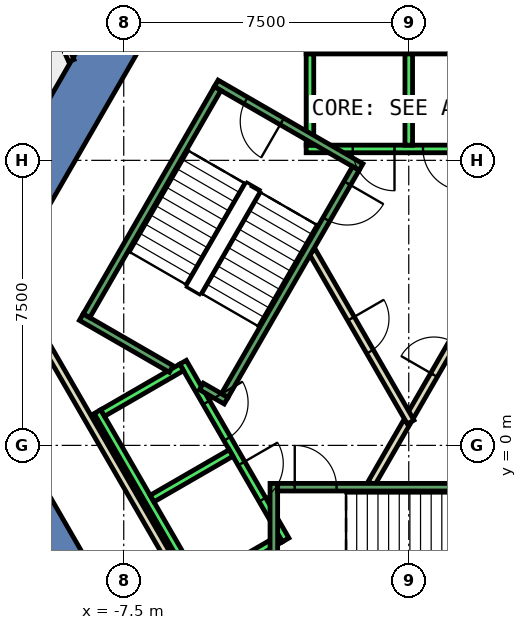
"""IFC4 building model, lengths in metres.
Left out: names, types, materials, properties, quantities, classifications, styles, units other than length and angle.
Written with IfcOpenShell. Run it as: python <this file> out.ifc"""

import sys

from ifc_helpers import new_model, si_unit, direction, frame, frame_2d, origin, place, context, subcontext, project, spatial, polyline, rectangle, outline, extrude, element, fill, save


model = new_model("IFC4")
c1 = context("Model", 3, precision=1e-05, world=origin(), true_north=direction((0.0, 1.0)))
c2 = subcontext(c1, "Body", "Model", "MODEL_VIEW")
j1 = project(units=[si_unit("LENGTHUNIT", "METRE"), si_unit("PLANEANGLEUNIT", "RADIAN")], contexts=[c1])
p1 = place(None, origin())
s1 = spatial("IfcSite", under=j1, at=p1, CompositionType="ELEMENT")
p2 = place(p1, origin())
s2 = spatial("IfcBuilding", under=s1, at=p2, CompositionType="ELEMENT")
p3 = place(p2, frame((0.0, 0.0, 231.8)))
s3 = spatial("IfcBuildingStorey", under=s2, at=p3, CompositionType="ELEMENT", Elevation=231.8)
p4 = place(p3, frame((0.0, 0.0, -0.4)))
e1 = element("IfcWall", 1, at=p4, inside=s3, PredefinedType="SHEAR", context=c2, shape_type="SweptSolid", body=[
    extrude(outline(polyline([(-11.834, 5.002), (-10.622, 4.302), (-5.831, 12.6), (-6.64, 14.0), (-11.834, 5.002)])), origin(), (0.0, 0.0, 1.0), 4.0),
])
p5 = place(p3, frame((0.0, 0.0, -0.4)))
e2 = element("IfcWall", 2, at=p5, inside=s3, PredefinedType="SHEAR", context=c2, shape_type="SweptSolid", body=[
    extrude(outline(polyline([(-13.279, 2.5), (-6.64, -9.0), (-5.831, -7.6), (-11.662, 2.5), (-13.279, 2.5)])), origin(), (0.0, 0.0, 1.0), 4.0),
])
p6 = place(p3, frame((-9.751, 2.99, 0.0), z_axis=(0.0, 0.0, 1.0), x_axis=(0.500012163284, -0.866018381195, 0.0)))
e3 = element("IfcWall", 3, at=p6, inside=s3, PredefinedType="PARTITIONING", context=c2, shape_type="SweptSolid", body=[
    extrude(rectangle(XDim=8.0, YDim=0.2, at=frame_2d((4.0, 0.0))), origin(), (0.0, 0.0, 1.0), 3.6),
])
p7 = place(p3, frame((-8.879, 10.123, 0.0), z_axis=(0.0, 0.0, 1.0), x_axis=(-0.404271206787, 0.914639159102, 0.0)))
e4 = element("IfcWall", 4, at=p7, inside=s3, PredefinedType="PARTITIONING", context=c2, shape_type="SweptSolid", body=[
    extrude(rectangle(XDim=3.495, YDim=0.15, at=frame_2d((1.748, 0.0))), origin(), (0.0, 0.0, 1.0), 3.6),
])
p8 = place(p3, frame((-0.982, -1.0, 0.0), z_axis=(0.0, 0.0, 1.0), x_axis=(0.50024047865, 0.865886518847, 0.0)))
e5 = element("IfcWall", 5, at=p8, inside=s3, PredefinedType="PARTITIONING", context=c2, shape_type="SweptSolid", body=[
    extrude(rectangle(XDim=1.863, YDim=0.2, at=frame_2d((0.931, 0.0))), origin(), (0.0, 0.0, 1.0), 3.6),
])
p9 = place(p3, frame((0.05, 0.787, 0.0), z_axis=(0.0, 0.0, 1.0), x_axis=(0.499954076797, 0.866051915934, 0.0)))
e6 = element("IfcWall", 6, at=p9, inside=s3, PredefinedType="PARTITIONING", context=c2, shape_type="SweptSolid", body=[
    extrude(rectangle(XDim=3.558, YDim=0.2, at=frame_2d((1.779, 0.0))), origin(), (0.0, 0.0, 1.0), 3.6),
])
p10 = place(p9, frame((1.229, 0.0, 0.0)))
e7 = element("IfcOpeningElement", 7, at=p10, cuts=e6, PredefinedType="OPENING", context=c2, shape_type="SweptSolid", body=[
    extrude(rectangle(XDim=1.0, YDim=2.1, at=frame_2d((0.5, 1.05))), frame((0.0, 0.11, 0.0), z_axis=(0.0, -1.0, 0.0), x_axis=(1.0, 0.0, 0.0)), (0.0, 0.0, 1.0), 0.22),
])
p11 = place(p3, frame((-2.54, 5.1, 0.0), z_axis=(0.0, 0.0, 1.0), x_axis=(0.499925051871, -0.866068670783, 0.0)))
e8 = element("IfcWall", 8, at=p11, inside=s3, PredefinedType="PARTITIONING", context=c2, shape_type="SweptSolid", body=[
    extrude(rectangle(XDim=5.181, YDim=0.2, at=frame_2d((2.59, 0.0))), origin(), (0.0, 0.0, 1.0), 3.6),
])
p12 = place(p11, frame((2.04, 0.0, 0.0)))
e9 = element("IfcOpeningElement", 9, at=p12, cuts=e8, PredefinedType="OPENING", context=c2, shape_type="SweptSolid", body=[
    extrude(rectangle(XDim=1.0, YDim=2.1, at=frame_2d((0.5, 1.05))), frame((0.0, 0.11, 0.0), z_axis=(0.0, -1.0, 0.0), x_axis=(1.0, 0.0, 0.0)), (0.0, 0.0, 1.0), 0.22),
])
p13 = place(p3, frame((2.7, 7.8, 0.0), z_axis=(0.0, 0.0, 1.0), x_axis=(-1.0, 0.0, 0.0)))
e10 = element("IfcWall", 10, at=p13, inside=s3, PredefinedType="STANDARD", context=c2, shape_type="SweptSolid", body=[
    extrude(rectangle(XDim=5.4, YDim=0.2, at=frame_2d((2.7, 0.0))), origin(), (0.0, 0.0, 1.0), 3.6),
])
p14 = place(p13, frame((1.225, 0.0, 0.0)))
e11 = element("IfcOpeningElement", 11, at=p14, cuts=e10, PredefinedType="OPENING", context=c2, shape_type="SweptSolid", body=[
    extrude(rectangle(XDim=1.1, YDim=2.1, at=frame_2d((0.55, 1.05))), frame((0.0, 0.11, 0.0), z_axis=(0.0, -1.0, 0.0), x_axis=(1.0, 0.0, 0.0)), (0.0, 0.0, 1.0), 0.22),
])
p15 = place(p13, frame((3.075, 0.0, 0.0)))
e12 = element("IfcOpeningElement", 12, at=p15, cuts=e10, PredefinedType="OPENING", context=c2, shape_type="SweptSolid", body=[
    extrude(rectangle(XDim=1.1, YDim=2.1, at=frame_2d((0.55, 1.05))), frame((0.0, 0.11, 0.0), z_axis=(0.0, -1.0, 0.0), x_axis=(1.0, 0.0, 0.0)), (0.0, 0.0, 1.0), 0.22),
])
p16 = place(p3, frame((2.7, 10.4, 0.0), z_axis=(0.0, 0.0, 1.0), x_axis=(-1.0, 0.0, 0.0)))
e13 = element("IfcWall", 13, at=p16, inside=s3, PredefinedType="STANDARD", context=c2, shape_type="SweptSolid", body=[
    extrude(rectangle(XDim=5.4, YDim=0.2, at=frame_2d((2.7, 0.0))), origin(), (0.0, 0.0, 1.0), 3.6),
])
for number, where, z_axis, x_axis in (
    (14, (0.0, 7.9, 0.0), (0.0, 0.0, 1.0), (0.0, 1.0, 0.0)),
    (15, (-2.6, 7.9, 0.0), (0.0, 0.0, 1.0), (0.0, 1.0, 0.0)),
):
    element("IfcWall", number, at=place(p3, frame(where, z_axis=z_axis, x_axis=x_axis)), inside=s3, PredefinedType="STANDARD", context=c2, shape_type="SweptSolid", body=[
        extrude(rectangle(XDim=2.4, YDim=0.2, at=frame_2d((1.2, 0.0))), origin(), (0.0, 0.0, 1.0), 3.6),
    ])
p17 = place(p3, frame((-5.94, 2.188, 0.0), z_axis=(0.0, 0.0, 1.0), x_axis=(0.500034260056, -0.866005622828, 0.0)))
e16 = element("IfcWall", 16, at=p17, inside=s3, PredefinedType="STANDARD", context=c2, shape_type="SweptSolid", body=[
    extrude(rectangle(XDim=5.399, YDim=0.2, at=frame_2d((2.7, 0.0))), origin(), (0.0, 0.0, 1.0), 3.6),
])
p18 = place(p17, frame((3.075, 0.0, 0.0)))
e17 = element("IfcOpeningElement", 17, at=p18, cuts=e16, PredefinedType="OPENING", context=c2, shape_type="SweptSolid", body=[
    extrude(rectangle(XDim=1.1, YDim=2.1, at=frame_2d((0.55, 1.05))), frame((0.0, 0.11, 0.0), z_axis=(0.0, -1.0, 0.0), x_axis=(1.0, 0.0, 0.0)), (0.0, 0.0, 1.0), 0.22),
])
p19 = place(p17, frame((1.225, 0.0, 0.0)))
e18 = element("IfcOpeningElement", 18, at=p19, cuts=e16, PredefinedType="OPENING", context=c2, shape_type="SweptSolid", body=[
    extrude(rectangle(XDim=1.1, YDim=2.1, at=frame_2d((0.55, 1.05))), frame((0.0, 0.11, 0.0), z_axis=(0.0, -1.0, 0.0), x_axis=(1.0, 0.0, 0.0)), (0.0, 0.0, 1.0), 0.22),
])
p20 = place(p3, frame((-8.192, 0.888, 0.0), z_axis=(0.0, 0.0, 1.0), x_axis=(0.500034260056, -0.866005622828, 0.0)))
e19 = element("IfcWall", 19, at=p20, inside=s3, PredefinedType="STANDARD", context=c2, shape_type="SweptSolid", body=[
    extrude(rectangle(XDim=5.399, YDim=0.2, at=frame_2d((2.7, 0.0))), origin(), (0.0, 0.0, 1.0), 3.6),
])
for number, where, z_axis, x_axis in (
    (20, (-5.977, 2.052, 0.0), (0.0, 0.0, 1.0), (-0.866, -0.5, 0.0)),
    (21, (-4.677, -0.2, 0.0), (0.0, 0.0, 1.0), (-0.866, -0.5, 0.0)),
):
    element("IfcWall", number, at=place(p3, frame(where, z_axis=z_axis, x_axis=x_axis)), inside=s3, PredefinedType="STANDARD", context=c2, shape_type="SweptSolid", body=[
        extrude(rectangle(XDim=2.399, YDim=0.2, at=frame_2d((1.2, 0.0))), origin(), (0.0, 0.0, 1.0), 3.6),
    ])
p21 = place(p3, frame((-3.377, -2.452, 0.0), z_axis=(0.0, 0.0, 1.0), x_axis=(-0.865955154139, -0.50012165622, 0.0)))
e22 = element("IfcWall", 22, at=p21, inside=s3, PredefinedType="STANDARD", context=c2, shape_type="SweptSolid", body=[
    extrude(rectangle(XDim=2.4, YDim=0.2, at=frame_2d((1.2, 0.0))), origin(), (0.0, 0.0, 1.0), 3.6),
])
p22 = place(p3, frame((-3.55, -1.0, 0.0), z_axis=(0.0, 0.0, 1.0), x_axis=(0.0, -1.0, 0.0)))
e23 = element("IfcWall", 23, at=p22, inside=s3, PredefinedType="STANDARD", context=c2, shape_type="SweptSolid", body=[
    extrude(rectangle(XDim=4.4, YDim=0.2, at=frame_2d((2.2, 0.0))), origin(), (0.0, 0.0, 1.0), 3.6),
])
p23 = place(p22, frame((2.4, 0.0, 0.0)))
e24 = element("IfcOpeningElement", 24, at=p23, cuts=e23, PredefinedType="OPENING", context=c2, shape_type="SweptSolid", body=[
    extrude(rectangle(XDim=1.1, YDim=2.2, at=frame_2d((0.55, 1.1))), frame((0.0, 0.11, 0.0), z_axis=(0.0, -1.0, 0.0), x_axis=(1.0, 0.0, 0.0)), (0.0, 0.0, 1.0), 0.22),
])
p24 = place(p3, frame((-3.45, -1.1, 0.0), z_axis=(0.0, 0.0, 1.0), x_axis=(1.0, 0.0, 0.0)))
e25 = element("IfcWall", 25, at=p24, inside=s3, PredefinedType="STANDARD", context=c2, shape_type="SweptSolid", body=[
    extrude(rectangle(XDim=6.9, YDim=0.2, at=frame_2d((3.45, 0.0))), origin(), (0.0, 0.0, 1.0), 3.6),
])
p25 = place(p24, frame((0.45, 0.0, 0.0)))
e26 = element("IfcOpeningElement", 26, at=p25, cuts=e25, PredefinedType="OPENING", context=c2, shape_type="SweptSolid", body=[
    extrude(rectangle(XDim=1.1, YDim=2.2, at=frame_2d((0.55, 1.1))), frame((0.0, 0.11, 0.0), z_axis=(0.0, -1.0, 0.0), x_axis=(1.0, 0.0, 0.0)), (0.0, 0.0, 1.0), 0.22),
])
p26 = place(p3, frame((-1.256, 7.324, 0.0), z_axis=(0.0, 0.0, 1.0), x_axis=(-0.866046073146, 0.499964197906, 0.0)))
e27 = element("IfcWall", 27, at=p26, inside=s3, PredefinedType="STANDARD", context=c2, shape_type="SweptSolid", body=[
    extrude(rectangle(XDim=4.4, YDim=0.2, at=frame_2d((2.2, 0.0))), origin(), (0.0, 0.0, 1.0), 3.6),
])
p27 = place(p26, frame((2.4, 0.0, 0.0)))
e28 = element("IfcOpeningElement", 28, at=p27, cuts=e27, PredefinedType="OPENING", context=c2, shape_type="SweptSolid", body=[
    extrude(rectangle(XDim=1.1, YDim=2.2, at=frame_2d((0.55, 1.1))), frame((0.0, 0.11, 0.0), z_axis=(0.0, -1.0, 0.0), x_axis=(1.0, 0.0, 0.0)), (0.0, 0.0, 1.0), 0.22),
])
p28 = place(p3, frame((-6.25, 2.01, 0.0), z_axis=(0.0, 0.0, 1.0), x_axis=(-0.86611865017, 0.499838457731, 0.0)))
e29 = element("IfcWall", 29, at=p28, inside=s3, PredefinedType="STANDARD", context=c2, shape_type="SweptSolid", body=[
    extrude(rectangle(XDim=2.733, YDim=0.2, at=frame_2d((1.366, 0.0))), origin(), (0.0, 0.0, 1.0), 3.6),
])
p29 = place(p3, frame((-4.806, 1.176, 0.0), z_axis=(0.0, 0.0, 1.0), x_axis=(-0.866558586415, 0.499075361355, 0.0)))
e30 = element("IfcWall", 30, at=p29, inside=s3, PredefinedType="STANDARD", context=c2, shape_type="SweptSolid", body=[
    extrude(rectangle(XDim=0.751, YDim=0.2, at=frame_2d((0.376, 0.0))), origin(), (0.0, 0.0, 1.0), 3.6),
])
p30 = place(p3, frame((-1.393, 7.288, 0.0), z_axis=(0.0, 0.0, 1.0), x_axis=(-0.499963383562, -0.866046543262, 0.0)))
e31 = element("IfcWall", 31, at=p30, inside=s3, PredefinedType="STANDARD", context=c2, shape_type="SweptSolid", body=[
    extrude(rectangle(XDim=6.9, YDim=0.2, at=frame_2d((3.45, 0.0))), origin(), (0.0, 0.0, 1.0), 3.6),
])
p31 = place(p30, frame((0.45, 0.0, 0.0)))
e32 = element("IfcOpeningElement", 32, at=p31, cuts=e31, PredefinedType="OPENING", context=c2, shape_type="SweptSolid", body=[
    extrude(rectangle(XDim=1.1, YDim=2.2, at=frame_2d((0.55, 1.1))), frame((0.0, 0.11, 0.0), z_axis=(0.0, -1.0, 0.0), x_axis=(1.0, 0.0, 0.0)), (0.0, 0.0, 1.0), 0.22),
])
p32 = place(p3, frame((-5.03, 9.388, 0.0), z_axis=(0.0, 0.0, 1.0), x_axis=(-0.499978703459, -0.866037698999, 0.0)))
e33 = element("IfcWall", 33, at=p32, inside=s3, PredefinedType="STANDARD", context=c2, shape_type="SweptSolid", body=[
    extrude(rectangle(XDim=6.9, YDim=0.2, at=frame_2d((3.45, 0.0))), origin(), (0.0, 0.0, 1.0), 3.6),
])
p33 = place(p10, origin())
e34 = element("IfcDoor", 34, at=p33, inside=s3, OperationType="SINGLE_SWING_RIGHT", PredefinedType="DOOR", context=c2, shape_type="SweptSolid", body=[
    extrude(rectangle(XDim=1.0, YDim=2.1, at=frame_2d((0.5, 1.05))), frame((0.0, 0.025, 0.0), z_axis=(0.0, -1.0, 0.0), x_axis=(1.0, 0.0, 0.0)), (0.0, 0.0, 1.0), 0.05),
])
fill(e7, e34)
p34 = place(p12, origin())
e35 = element("IfcDoor", 35, at=p34, inside=s3, OperationType="SINGLE_SWING_RIGHT", PredefinedType="DOOR", context=c2, shape_type="SweptSolid", body=[
    extrude(rectangle(XDim=1.0, YDim=2.1, at=frame_2d((0.5, 1.05))), frame((0.0, 0.025, 0.0), z_axis=(0.0, -1.0, 0.0), x_axis=(1.0, 0.0, 0.0)), (0.0, 0.0, 1.0), 0.05),
])
fill(e9, e35)
p35 = place(p14, origin())
e36 = element("IfcDoor", 36, at=p35, inside=s3, OperationType="SLIDING_TO_LEFT", PredefinedType="DOOR", context=c2, shape_type="SweptSolid", body=[
    extrude(rectangle(XDim=1.1, YDim=2.1, at=frame_2d((0.55, 1.05))), frame((0.0, 0.025, 0.0), z_axis=(0.0, -1.0, 0.0), x_axis=(1.0, 0.0, 0.0)), (0.0, 0.0, 1.0), 0.05),
])
fill(e11, e36)
p36 = place(p15, origin())
e37 = element("IfcDoor", 37, at=p36, inside=s3, OperationType="SLIDING_TO_LEFT", PredefinedType="DOOR", context=c2, shape_type="SweptSolid", body=[
    extrude(rectangle(XDim=1.1, YDim=2.1, at=frame_2d((0.55, 1.05))), frame((0.0, 0.025, 0.0), z_axis=(0.0, -1.0, 0.0), x_axis=(1.0, 0.0, 0.0)), (0.0, 0.0, 1.0), 0.05),
])
fill(e12, e37)
p37 = place(p18, origin())
e38 = element("IfcDoor", 38, at=p37, inside=s3, OperationType="SLIDING_TO_LEFT", PredefinedType="DOOR", context=c2, shape_type="SweptSolid", body=[
    extrude(rectangle(XDim=1.1, YDim=2.1, at=frame_2d((0.55, 1.05))), frame((0.0, 0.025, 0.0), z_axis=(0.0, -1.0, 0.0), x_axis=(1.0, 0.0, 0.0)), (0.0, 0.0, 1.0), 0.05),
])
fill(e17, e38)
p38 = place(p19, origin())
e39 = element("IfcDoor", 39, at=p38, inside=s3, OperationType="SLIDING_TO_LEFT", PredefinedType="DOOR", context=c2, shape_type="SweptSolid", body=[
    extrude(rectangle(XDim=1.1, YDim=2.1, at=frame_2d((0.55, 1.05))), frame((0.0, 0.025, 0.0), z_axis=(0.0, -1.0, 0.0), x_axis=(1.0, 0.0, 0.0)), (0.0, 0.0, 1.0), 0.05),
])
fill(e18, e39)
p39 = place(p25, origin())
e40 = element("IfcDoor", 40, at=p39, inside=s3, OperationType="SINGLE_SWING_LEFT", PredefinedType="DOOR", context=c2, shape_type="SweptSolid", body=[
    extrude(rectangle(XDim=1.1, YDim=2.2, at=frame_2d((0.55, 1.1))), frame((0.0, 0.025, 0.0), z_axis=(0.0, -1.0, 0.0), x_axis=(1.0, 0.0, 0.0)), (0.0, 0.0, 1.0), 0.05),
])
fill(e26, e40)
p40 = place(p31, origin())
e41 = element("IfcDoor", 41, at=p40, inside=s3, OperationType="SINGLE_SWING_LEFT", PredefinedType="DOOR", context=c2, shape_type="SweptSolid", body=[
    extrude(rectangle(XDim=1.1, YDim=2.2, at=frame_2d((0.55, 1.1))), frame((0.0, 0.025, 0.0), z_axis=(0.0, -1.0, 0.0), x_axis=(1.0, 0.0, 0.0)), (0.0, 0.0, 1.0), 0.05),
])
fill(e32, e41)
p41 = place(p27, origin())
e42 = element("IfcDoor", 42, at=p41, inside=s3, OperationType="SINGLE_SWING_LEFT", PredefinedType="DOOR", context=c2, shape_type="SweptSolid", body=[
    extrude(rectangle(XDim=1.1, YDim=2.2, at=frame_2d((0.55, 1.1))), frame((0.0, 0.025, 0.0), z_axis=(0.0, -1.0, 0.0), x_axis=(1.0, 0.0, 0.0)), (0.0, 0.0, 1.0), 0.05),
])
fill(e28, e42)
save(model, sys.argv[1])
